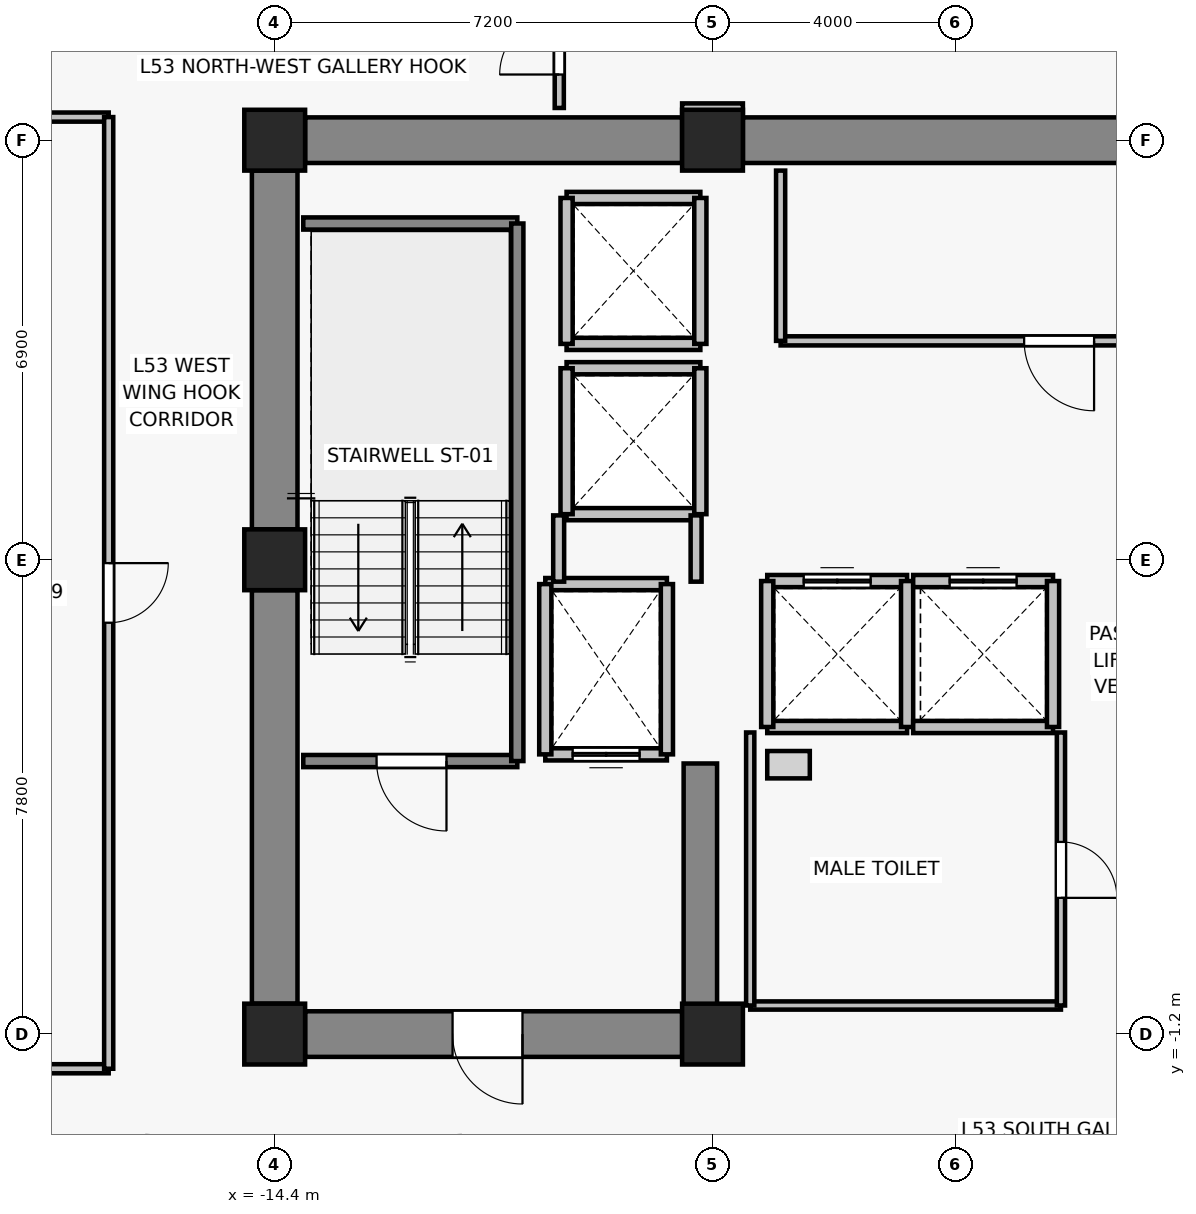
"""IFC4 building model, lengths in metres.
Left out: names, types, materials, properties, quantities, classifications, styles, units other than length and angle.
Written with IfcOpenShell. Run it as: python <this file> out.ifc"""

import sys

from ifc_helpers import new_model, si_unit, direction, frame, frame_2d, origin, origin_2d, place, context, subcontext, project, spatial, rectangle, extrude, source, transform, mapped, element, fill, save


model = new_model("IFC4")
c1 = context("Model", 3, precision=1e-05, world=origin(), true_north=direction((0.0, 1.0)))
c2 = subcontext(c1, "Body", "Model", "MODEL_VIEW")
j1 = project(units=[si_unit("LENGTHUNIT", "METRE"), si_unit("PLANEANGLEUNIT", "RADIAN")], contexts=[c1])
p1 = place(None, origin())
s1 = spatial("IfcSite", under=j1, at=p1, CompositionType="ELEMENT")
p2 = place(p1, origin())
s2 = spatial("IfcBuilding", under=s1, at=p2, CompositionType="ELEMENT")
p3 = place(p2, frame((0.0, 0.0, 189.1)))
s3 = spatial("IfcBuildingStorey", under=s2, at=p3, CompositionType="ELEMENT", Elevation=189.1)
for number, where, z_axis, x_axis in (
    (1, (-14.4, -1.2, 0.0), (0.0, 0.0, 1.0), (1.0, 0.0, 0.0)),
    (2, (-7.2, -1.2, 0.0), (0.0, 0.0, 1.0), (1.0, 0.0, 0.0)),
    (3, (-14.4, 6.6, 0.0), (0.0, 0.0, 1.0), (1.0, 0.0, 0.0)),
    (4, (-14.4, 13.5, 0.0), (0.0, 0.0, 1.0), (1.0, 0.0, 0.0)),
    (5, (-7.2, 13.5, 0.0), (0.0, 0.0, 1.0), (1.0, 0.0, 0.0)),
):
    element("IfcColumn", number, at=place(p3, frame(where, z_axis=z_axis, x_axis=x_axis)), inside=s3, PredefinedType="COLUMN", context=c2, shape_type="SweptSolid", body=[
        extrude(rectangle(XDim=1.0, YDim=1.0, at=origin_2d()), origin(), (0.0, 0.0, 1.0), 3.3),
    ])
p4 = place(p3, frame((-13.9, 13.5, 0.0), z_axis=(0.0, 0.0, 1.0), x_axis=(1.0, 0.0, 0.0)))
e6 = element("IfcWall", 6, at=p4, inside=s3, PredefinedType="SHEAR", context=c2, shape_type="SweptSolid", body=[
    extrude(rectangle(XDim=6.2, YDim=0.75, at=frame_2d((3.1, 0.0))), origin(), (0.0, 0.0, 1.0), 3.075),
])
p5 = place(p3, frame((-6.7, 13.5, 0.0), z_axis=(0.0, 0.0, 1.0), x_axis=(1.0, 0.0, 0.0)))
e7 = element("IfcWall", 7, at=p5, inside=s3, PredefinedType="SHEAR", context=c2, shape_type="SweptSolid", body=[
    extrude(rectangle(XDim=13.4, YDim=0.75, at=frame_2d((6.7, 0.0))), origin(), (0.0, 0.0, 1.0), 3.075),
])
p6 = place(p3, frame((-14.4, -0.7, 0.0), z_axis=(0.0, 0.0, 1.0), x_axis=(0.0, 1.0, 0.0)))
e8 = element("IfcWall", 8, at=p6, inside=s3, PredefinedType="SHEAR", context=c2, shape_type="SweptSolid", body=[
    extrude(rectangle(XDim=6.8, YDim=0.75, at=frame_2d((3.4, 0.0))), origin(), (0.0, 0.0, 1.0), 3.075),
])
p7 = place(p3, frame((-14.4, 7.1, 0.0), z_axis=(0.0, 0.0, 1.0), x_axis=(0.0, 1.0, 0.0)))
e9 = element("IfcWall", 9, at=p7, inside=s3, PredefinedType="SHEAR", context=c2, shape_type="SweptSolid", body=[
    extrude(rectangle(XDim=5.9, YDim=0.75, at=frame_2d((2.95, 0.0))), origin(), (0.0, 0.0, 1.0), 3.075),
])
p8 = place(p3, frame((-7.7, -1.2, 0.0), z_axis=(0.0, 0.0, 1.0), x_axis=(-1.0, 0.0, 0.0)))
e10 = element("IfcWall", 10, at=p8, inside=s3, PredefinedType="SHEAR", context=c2, shape_type="SweptSolid", body=[
    extrude(rectangle(XDim=6.2, YDim=0.75, at=frame_2d((3.1, 0.0))), origin(), (0.0, 0.0, 1.0), 3.075),
])
p9 = place(p8, frame((2.625, 0.0, 0.0)))
e11 = element("IfcOpeningElement", 11, at=p9, cuts=e10, PredefinedType="OPENING", context=c2, shape_type="SweptSolid", body=[
    extrude(rectangle(XDim=1.15, YDim=2.15, at=frame_2d((0.575, 1.075))), frame((0.0, 0.385, 0.0), z_axis=(0.0, -1.0, 0.0), x_axis=(1.0, 0.0, 0.0)), (0.0, 0.0, 1.0), 0.77),
])
p10 = place(p3, frame((-7.4, -0.825, 0.0), z_axis=(0.0, 0.0, 1.0), x_axis=(0.0, 1.0, 0.0)))
e12 = element("IfcWall", 12, at=p10, inside=s3, PredefinedType="SHEAR", context=c2, shape_type="SweptSolid", body=[
    extrude(rectangle(XDim=4.075, YDim=0.55, at=frame_2d((2.038, 0.0))), origin(), (0.0, 0.0, 1.0), 3.075),
])
p11 = place(p3, frame((-7.95, 3.4, 0.0), z_axis=(0.0, 0.0, 1.0), x_axis=(-1.0, 0.0, 0.0)))
e13 = element("IfcWall", 13, at=p11, inside=s3, PredefinedType="SOLIDWALL", context=c2, shape_type="SweptSolid", body=[
    extrude(rectangle(XDim=2.0, YDim=0.2, at=frame_2d((1.0, 0.0))), origin(), (0.0, 0.0, 1.0), 3.075),
])
p12 = place(p11, frame((0.45, 0.0, 0.0)))
e14 = element("IfcOpeningElement", 14, at=p12, cuts=e13, PredefinedType="OPENING", context=c2, shape_type="SweptSolid", body=[
    extrude(rectangle(XDim=1.1, YDim=2.2, at=frame_2d((0.55, 1.1))), frame((0.0, 0.11, 0.0), z_axis=(0.0, -1.0, 0.0), x_axis=(1.0, 0.0, 0.0)), (0.0, 0.0, 1.0), 0.22),
])
p13 = place(p3, frame((-9.95, 6.2, 0.0), z_axis=(0.0, 0.0, 1.0), x_axis=(1.0, 0.0, 0.0)))
e15 = element("IfcWall", 15, at=p13, inside=s3, PredefinedType="SOLIDWALL", context=c2, shape_type="SweptSolid", body=[
    extrude(rectangle(XDim=2.0, YDim=0.2, at=frame_2d((1.0, 0.0))), origin(), (0.0, 0.0, 1.0), 3.075),
])
for number, where, z_axis, x_axis in (
    (16, (-9.95, 3.4, 0.0), (0.0, 0.0, 1.0), (0.0, 1.0, 0.0)),
    (17, (-7.95, 6.2, 0.0), (0.0, 0.0, 1.0), (0.0, -1.0, 0.0)),
):
    element("IfcWall", number, at=place(p3, frame(where, z_axis=z_axis, x_axis=x_axis)), inside=s3, PredefinedType="SOLIDWALL", context=c2, shape_type="SweptSolid", body=[
        extrude(rectangle(XDim=2.8, YDim=0.2, at=frame_2d((1.4, 0.0))), origin(), (0.0, 0.0, 1.0), 3.075),
    ])
p14 = place(p3, frame((-4.0, 3.85, 0.0), z_axis=(0.0, 0.0, 1.0), x_axis=(-1.0, 0.0, 0.0)))
e18 = element("IfcWall", 18, at=p14, inside=s3, PredefinedType="SOLIDWALL", context=c2, shape_type="SweptSolid", body=[
    extrude(rectangle(XDim=2.3, YDim=0.2, at=frame_2d((1.15, 0.0))), origin(), (0.0, 0.0, 1.0), 3.075),
])
p15 = place(p3, frame((-6.3, 6.25, 0.0), z_axis=(0.0, 0.0, 1.0), x_axis=(1.0, 0.0, 0.0)))
e19 = element("IfcWall", 19, at=p15, inside=s3, PredefinedType="SOLIDWALL", context=c2, shape_type="SweptSolid", body=[
    extrude(rectangle(XDim=2.3, YDim=0.2, at=frame_2d((1.15, 0.0))), origin(), (0.0, 0.0, 1.0), 3.075),
])
p16 = place(p15, frame((0.6, 0.0, 0.0)))
e20 = element("IfcOpeningElement", 20, at=p16, cuts=e19, PredefinedType="OPENING", context=c2, shape_type="SweptSolid", body=[
    extrude(rectangle(XDim=1.1, YDim=2.2, at=frame_2d((0.55, 1.1))), frame((0.0, 0.11, 0.0), z_axis=(0.0, -1.0, 0.0), x_axis=(1.0, 0.0, 0.0)), (0.0, 0.0, 1.0), 0.22),
])
for number, where, z_axis, x_axis in (
    (21, (-6.3, 3.85, 0.0), (0.0, 0.0, 1.0), (0.0, 1.0, 0.0)),
    (22, (-4.0, 6.25, 0.0), (0.0, 0.0, 1.0), (0.0, -1.0, 0.0)),
):
    element("IfcWall", number, at=place(p3, frame(where, z_axis=z_axis, x_axis=x_axis)), inside=s3, PredefinedType="SOLIDWALL", context=c2, shape_type="SweptSolid", body=[
        extrude(rectangle(XDim=2.4, YDim=0.2, at=frame_2d((1.2, 0.0))), origin(), (0.0, 0.0, 1.0), 3.075),
    ])
p17 = place(p3, frame((-1.6, 3.85, 0.0), z_axis=(0.0, 0.0, 1.0), x_axis=(-1.0, 0.0, 0.0)))
e23 = element("IfcWall", 23, at=p17, inside=s3, PredefinedType="SOLIDWALL", context=c2, shape_type="SweptSolid", body=[
    extrude(rectangle(XDim=2.3, YDim=0.2, at=frame_2d((1.15, 0.0))), origin(), (0.0, 0.0, 1.0), 3.075),
])
p18 = place(p3, frame((-3.9, 6.25, 0.0), z_axis=(0.0, 0.0, 1.0), x_axis=(1.0, 0.0, 0.0)))
e24 = element("IfcWall", 24, at=p18, inside=s3, PredefinedType="SOLIDWALL", context=c2, shape_type="SweptSolid", body=[
    extrude(rectangle(XDim=2.3, YDim=0.2, at=frame_2d((1.15, 0.0))), origin(), (0.0, 0.0, 1.0), 3.075),
])
p19 = place(p18, frame((0.6, 0.0, 0.0)))
e25 = element("IfcOpeningElement", 25, at=p19, cuts=e24, PredefinedType="OPENING", context=c2, shape_type="SweptSolid", body=[
    extrude(rectangle(XDim=1.1, YDim=2.2, at=frame_2d((0.55, 1.1))), frame((0.0, 0.11, 0.0), z_axis=(0.0, -1.0, 0.0), x_axis=(1.0, 0.0, 0.0)), (0.0, 0.0, 1.0), 0.22),
])
p20 = place(p3, frame((-1.6, 6.25, 0.0), z_axis=(0.0, 0.0, 1.0), x_axis=(0.0, -1.0, 0.0)))
e26 = element("IfcWall", 26, at=p20, inside=s3, PredefinedType="SOLIDWALL", context=c2, shape_type="SweptSolid", body=[
    extrude(rectangle(XDim=2.4, YDim=0.2, at=frame_2d((1.2, 0.0))), origin(), (0.0, 0.0, 1.0), 3.075),
])
for number, where, z_axis, x_axis in (
    (27, (-7.4, 7.35, 0.0), (0.0, 0.0, 1.0), (-1.0, 0.0, 0.0)),
    (28, (-9.6, 9.75, 0.0), (0.0, 0.0, 1.0), (1.0, 0.0, 0.0)),
):
    element("IfcWall", number, at=place(p3, frame(where, z_axis=z_axis, x_axis=x_axis)), inside=s3, PredefinedType="SOLIDWALL", context=c2, shape_type="SweptSolid", body=[
        extrude(rectangle(XDim=2.2, YDim=0.2, at=frame_2d((1.1, 0.0))), origin(), (0.0, 0.0, 1.0), 2.565),
    ])
p21 = place(p3, frame((-9.6, 7.35, 0.0), z_axis=(0.0, 0.0, 1.0), x_axis=(0.0, 1.0, 0.0)))
e29 = element("IfcWall", 29, at=p21, inside=s3, PredefinedType="SOLIDWALL", context=c2, shape_type="SweptSolid", body=[
    extrude(rectangle(XDim=2.4, YDim=0.2, at=frame_2d((1.2, 0.0))), origin(), (0.0, 0.0, 1.0), 3.075),
])
p22 = place(p3, frame((-7.4, 9.75, 0.0), z_axis=(0.0, 0.0, 1.0), x_axis=(0.0, -1.0, 0.0)))
e30 = element("IfcWall", 30, at=p22, inside=s3, PredefinedType="SOLIDWALL", context=c2, shape_type="SweptSolid", body=[
    extrude(rectangle(XDim=2.4, YDim=0.2, at=frame_2d((1.2, 0.0))), origin(), (0.0, 0.0, 1.0), 2.565),
])
for number, where, z_axis, x_axis in (
    (31, (-7.4, 10.15, 0.0), (0.0, 0.0, 1.0), (-1.0, 0.0, 0.0)),
    (32, (-9.6, 12.55, 0.0), (0.0, 0.0, 1.0), (1.0, 0.0, 0.0)),
):
    element("IfcWall", number, at=place(p3, frame(where, z_axis=z_axis, x_axis=x_axis)), inside=s3, PredefinedType="SOLIDWALL", context=c2, shape_type="SweptSolid", body=[
        extrude(rectangle(XDim=2.2, YDim=0.2, at=frame_2d((1.1, 0.0))), origin(), (0.0, 0.0, 1.0), 2.565),
    ])
p23 = place(p3, frame((-9.6, 10.15, 0.0), z_axis=(0.0, 0.0, 1.0), x_axis=(0.0, 1.0, 0.0)))
e33 = element("IfcWall", 33, at=p23, inside=s3, PredefinedType="SOLIDWALL", context=c2, shape_type="SweptSolid", body=[
    extrude(rectangle(XDim=2.4, YDim=0.2, at=frame_2d((1.2, 0.0))), origin(), (0.0, 0.0, 1.0), 3.075),
])
p24 = place(p3, frame((-7.4, 12.55, 0.0), z_axis=(0.0, 0.0, 1.0), x_axis=(0.0, -1.0, 0.0)))
e34 = element("IfcWall", 34, at=p24, inside=s3, PredefinedType="SOLIDWALL", context=c2, shape_type="SweptSolid", body=[
    extrude(rectangle(XDim=2.4, YDim=0.2, at=frame_2d((1.2, 0.0))), origin(), (0.0, 0.0, 1.0), 2.565),
])
p25 = place(p3, frame((-10.41, 3.29, 0.0), z_axis=(0.0, 0.0, 1.0), x_axis=(-1.0, 0.0, 0.0)))
e35 = element("IfcWall", 35, at=p25, inside=s3, PredefinedType="SOLIDWALL", context=c2, shape_type="SweptSolid", body=[
    extrude(rectangle(XDim=3.52, YDim=0.2, at=frame_2d((1.76, 0.0))), origin(), (0.0, 0.0, 1.0), 3.075),
])
p26 = place(p25, frame((1.165, 0.0, 0.0)))
e36 = element("IfcOpeningElement", 36, at=p26, cuts=e35, PredefinedType="OPENING", context=c2, shape_type="SweptSolid", body=[
    extrude(rectangle(XDim=1.15, YDim=2.15, at=frame_2d((0.575, 1.075))), frame((0.0, 0.11, 0.0), z_axis=(0.0, -1.0, 0.0), x_axis=(1.0, 0.0, 0.0)), (0.0, 0.0, 1.0), 0.22),
])
p27 = place(p3, frame((-13.93, 12.13, 0.0), z_axis=(0.0, 0.0, 1.0), x_axis=(1.0, 0.0, 0.0)))
e37 = element("IfcWall", 37, at=p27, inside=s3, PredefinedType="SOLIDWALL", context=c2, shape_type="SweptSolid", body=[
    extrude(rectangle(XDim=3.52, YDim=0.2, at=frame_2d((1.76, 0.0))), origin(), (0.0, 0.0, 1.0), 3.075),
])
p28 = place(p3, frame((-10.41, 12.13, 0.0), z_axis=(0.0, 0.0, 1.0), x_axis=(0.0, -1.0, 0.0)))
e38 = element("IfcWall", 38, at=p28, inside=s3, PredefinedType="SOLIDWALL", context=c2, shape_type="SweptSolid", body=[
    extrude(rectangle(XDim=8.84, YDim=0.2, at=frame_2d((4.42, 0.0))), origin(), (0.0, 0.0, 1.0), 3.075),
])
p29 = place(p3, frame((-9.73, 6.24, 0.0), z_axis=(0.0, 0.0, 1.0), x_axis=(0.0, 1.0, 0.0)))
e39 = element("IfcWall", 39, at=p29, inside=s3, PredefinedType="PARTITIONING", context=c2, shape_type="SweptSolid", body=[
    extrude(rectangle(XDim=1.09, YDim=0.18, at=frame_2d((0.545, 0.0))), origin(), (0.0, 0.0, 1.0), 3.075),
])
p30 = place(p3, frame((-7.47, 7.33, 0.0), z_axis=(0.0, 0.0, 1.0), x_axis=(0.0, -1.0, 0.0)))
e40 = element("IfcWall", 40, at=p30, inside=s3, PredefinedType="PARTITIONING", context=c2, shape_type="SweptSolid", body=[
    extrude(rectangle(XDim=1.09, YDim=0.18, at=frame_2d((0.545, 0.0))), origin(), (0.0, 0.0, 1.0), 2.565),
])
p31 = place(p3, frame((6.08, 10.2, 0.0), z_axis=(0.0, 0.0, 1.0), x_axis=(-1.0, 0.0, 0.0)))
e41 = element("IfcWall", 41, at=p31, inside=s3, PredefinedType="PARTITIONING", context=c2, shape_type="SweptSolid", body=[
    extrude(rectangle(XDim=12.16, YDim=0.15, at=frame_2d((6.08, 0.0))), origin(), (0.0, 0.0, 1.0), 3.075),
])
p32 = place(p31, frame((7.005, 0.0, 0.0)))
e42 = element("IfcOpeningElement", 42, at=p32, cuts=e41, PredefinedType="OPENING", context=c2, shape_type="SweptSolid", body=[
    extrude(rectangle(XDim=1.15, YDim=2.15, at=frame_2d((0.575, 1.075))), frame((0.0, 0.085, 0.0), z_axis=(0.0, -1.0, 0.0), x_axis=(1.0, 0.0, 0.0)), (0.0, 0.0, 1.0), 0.17),
])
p33 = place(p3, frame((-6.08, 10.2, 0.0), z_axis=(0.0, 0.0, 1.0), x_axis=(0.0, 1.0, 0.0)))
e43 = element("IfcWall", 43, at=p33, inside=s3, PredefinedType="PARTITIONING", context=c2, shape_type="SweptSolid", body=[
    extrude(rectangle(XDim=2.8, YDim=0.15, at=frame_2d((1.4, 0.0))), origin(), (0.0, 0.0, 1.0), 3.075),
])
p34 = place(p3, frame((-1.47, -0.73, 0.0), z_axis=(0.0, 0.0, 1.0), x_axis=(-1.0, 0.0, 0.0)))
e44 = element("IfcWall", 44, at=p34, inside=s3, PredefinedType="PARTITIONING", context=c2, shape_type="SweptSolid", body=[
    extrude(rectangle(XDim=5.11, YDim=0.135, at=frame_2d((2.555, 0.0))), origin(), (0.0, 0.0, 1.0), 3.075),
])
p35 = place(p3, frame((-6.58, -0.73, 0.0), z_axis=(0.0, 0.0, 1.0), x_axis=(0.0, 1.0, 0.0)))
e45 = element("IfcWall", 45, at=p35, inside=s3, PredefinedType="PARTITIONING", context=c2, shape_type="SweptSolid", body=[
    extrude(rectangle(XDim=4.49, YDim=0.135, at=frame_2d((2.245, 0.0))), origin(), (0.0, 0.0, 1.0), 3.075),
])
p36 = place(p3, frame((-1.47, 3.76, 0.0), z_axis=(0.0, 0.0, 1.0), x_axis=(0.0, -1.0, 0.0)))
e46 = element("IfcWall", 46, at=p36, inside=s3, PredefinedType="PARTITIONING", context=c2, shape_type="SweptSolid", body=[
    extrude(rectangle(XDim=4.49, YDim=0.135, at=frame_2d((2.245, 0.0))), origin(), (0.0, 0.0, 1.0), 3.075),
])
p37 = place(p36, frame((1.8, 0.0, 0.0)))
e47 = element("IfcOpeningElement", 47, at=p37, cuts=e46, PredefinedType="OPENING", context=c2, shape_type="SweptSolid", body=[
    extrude(rectangle(XDim=0.92, YDim=2.1, at=frame_2d((0.46, 1.05))), frame((0.0, 0.077, 0.0), z_axis=(0.0, -1.0, 0.0), x_axis=(1.0, 0.0, 0.0)), (0.0, 0.0, 1.0), 0.155),
])
p38 = place(p3, frame((-17.13, -1.77, 0.0), z_axis=(0.0, 0.0, 1.0), x_axis=(-1.0, 0.0, 0.0)))
e48 = element("IfcWall", 48, at=p38, inside=s3, PredefinedType="PARTITIONING", context=c2, shape_type="SweptSolid", body=[
    extrude(rectangle(XDim=5.4, YDim=0.15, at=frame_2d((2.7, 0.0))), origin(), (0.0, 0.0, 1.0), 2.565),
])
p39 = place(p3, frame((-22.53, 13.88, 0.0), z_axis=(0.0, 0.0, 1.0), x_axis=(1.0, 0.0, 0.0)))
e49 = element("IfcWall", 49, at=p39, inside=s3, PredefinedType="PARTITIONING", context=c2, shape_type="SweptSolid", body=[
    extrude(rectangle(XDim=5.4, YDim=0.15, at=frame_2d((2.7, 0.0))), origin(), (0.0, 0.0, 1.0), 3.075),
])
p40 = place(p3, frame((-17.13, 13.88, 0.0), z_axis=(0.0, 0.0, 1.0), x_axis=(0.0, -1.0, 0.0)))
e50 = element("IfcWall", 50, at=p40, inside=s3, PredefinedType="PARTITIONING", context=c2, shape_type="SweptSolid", body=[
    extrude(rectangle(XDim=15.65, YDim=0.15, at=frame_2d((7.825, 0.0))), origin(), (0.0, 0.0, 1.0), 2.565),
])
p41 = place(p40, frame((7.335, 0.0, 0.0)))
e51 = element("IfcOpeningElement", 51, at=p41, cuts=e50, PredefinedType="OPENING", context=c2, shape_type="SweptSolid", body=[
    extrude(rectangle(XDim=0.98, YDim=2.15, at=frame_2d((0.49, 1.075))), frame((0.0, 0.085, 0.0), z_axis=(0.0, -1.0, 0.0), x_axis=(1.0, 0.0, 0.0)), (0.0, 0.0, 1.0), 0.17),
])
p42 = place(p3, frame((-6.7, 14.03, 0.0), z_axis=(0.0, 0.0, 1.0), x_axis=(-1.0, 0.0, 0.0)))
e52 = element("IfcWall", 52, at=p42, inside=s3, PredefinedType="PARTITIONING", context=c2, shape_type="SweptSolid", body=[
    extrude(rectangle(XDim=1.0, YDim=0.15, at=frame_2d((0.5, 0.0))), origin(), (0.0, 0.0, 1.0), 2.565),
])
p43 = place(p3, frame((-9.72, 14.03, 0.0), z_axis=(0.0, 0.0, 1.0), x_axis=(0.0, 1.0, 0.0)))
e53 = element("IfcWall", 53, at=p43, inside=s3, PredefinedType="PARTITIONING", context=c2, shape_type="SweptSolid", body=[
    extrude(rectangle(XDim=3.3, YDim=0.15, at=frame_2d((1.65, 0.0))), origin(), (0.0, 0.0, 1.0), 2.565),
])
p44 = place(p43, frame((0.55, 0.0, 0.0)))
e54 = element("IfcOpeningElement", 54, at=p44, cuts=e53, PredefinedType="OPENING", context=c2, shape_type="SweptSolid", body=[
    extrude(rectangle(XDim=0.98, YDim=2.15, at=frame_2d((0.49, 1.075))), frame((0.0, 0.085, 0.0), z_axis=(0.0, -1.0, 0.0), x_axis=(1.0, 0.0, 0.0)), (0.0, 0.0, 1.0), 0.17),
])
m1 = source(origin(), c2, "Body", "SweptSolid", [
    extrude(rectangle(XDim=1.1, YDim=2.2, at=frame_2d((0.55, 1.1))), frame((0.0, 0.025, 0.0), z_axis=(0.0, -1.0, 0.0), x_axis=(1.0, 0.0, 0.0)), (0.0, 0.0, 1.0), 0.05),
])
p45 = place(p12, origin())
e55 = element("IfcDoor", 55, at=p45, inside=s3, OperationType="DOUBLE_DOOR_SLIDING", PredefinedType="DOOR", context=c2, shape_type="MappedRepresentation", body=[
    mapped(m1, transform((0.0, 0.0, 0.0), x_axis=(1.0, 0.0, 0.0), y_axis=(0.0, 1.0, 0.0), z_axis=(0.0, 0.0, 1.0), scale=1.0)),
])
fill(e14, e55)
p46 = place(p16, origin())
e56 = element("IfcDoor", 56, at=p46, inside=s3, OperationType="DOUBLE_DOOR_SLIDING", PredefinedType="DOOR", context=c2, shape_type="MappedRepresentation", body=[
    mapped(m1, transform((0.0, 0.0, 0.0), x_axis=(1.0, 0.0, 0.0), y_axis=(0.0, 1.0, 0.0), z_axis=(0.0, 0.0, 1.0), scale=1.0)),
])
fill(e20, e56)
p47 = place(p19, origin())
e57 = element("IfcDoor", 57, at=p47, inside=s3, OperationType="DOUBLE_DOOR_SLIDING", PredefinedType="DOOR", context=c2, shape_type="MappedRepresentation", body=[
    mapped(m1, transform((0.0, 0.0, 0.0), x_axis=(1.0, 0.0, 0.0), y_axis=(0.0, 1.0, 0.0), z_axis=(0.0, 0.0, 1.0), scale=1.0)),
])
fill(e25, e57)
m2 = source(origin(), c2, "Body", "SweptSolid", [
    extrude(rectangle(XDim=1.15, YDim=2.15, at=frame_2d((0.575, 1.075))), frame((0.0, 0.025, 0.0), z_axis=(0.0, -1.0, 0.0), x_axis=(1.0, 0.0, 0.0)), (0.0, 0.0, 1.0), 0.05),
])
p48 = place(p26, origin())
e58 = element("IfcDoor", 58, at=p48, inside=s3, OperationType="SINGLE_SWING_LEFT", PredefinedType="DOOR", context=c2, shape_type="MappedRepresentation", body=[
    mapped(m2, transform((0.0, 0.0, 0.0), x_axis=(1.0, 0.0, 0.0), y_axis=(0.0, 1.0, 0.0), z_axis=(0.0, 0.0, 1.0), scale=1.0)),
])
fill(e36, e58)
p49 = place(p9, origin())
e59 = element("IfcDoor", 59, at=p49, inside=s3, OperationType="SINGLE_SWING_LEFT", PredefinedType="DOOR", context=c2, shape_type="MappedRepresentation", body=[
    mapped(m2, transform((0.0, 0.0, 0.0), x_axis=(1.0, 0.0, 0.0), y_axis=(0.0, 1.0, 0.0), z_axis=(0.0, 0.0, 1.0), scale=1.0)),
])
fill(e11, e59)
p50 = place(p32, origin())
e60 = element("IfcDoor", 60, at=p50, inside=s3, OperationType="SINGLE_SWING_LEFT", PredefinedType="DOOR", context=c2, shape_type="MappedRepresentation", body=[
    mapped(m2, transform((0.0, 0.0, 0.0), x_axis=(1.0, 0.0, 0.0), y_axis=(0.0, 1.0, 0.0), z_axis=(0.0, 0.0, 1.0), scale=1.0)),
])
fill(e42, e60)
m3 = source(origin(), c2, "Body", "SweptSolid", [
    extrude(rectangle(XDim=0.92, YDim=2.1, at=frame_2d((0.46, 1.05))), frame((0.0, 0.025, 0.0), z_axis=(0.0, -1.0, 0.0), x_axis=(1.0, 0.0, 0.0)), (0.0, 0.0, 1.0), 0.05),
])
p51 = place(p37, origin())
e61 = element("IfcDoor", 61, at=p51, inside=s3, OperationType="SINGLE_SWING_RIGHT", PredefinedType="DOOR", context=c2, shape_type="MappedRepresentation", body=[
    mapped(m3, transform((0.0, 0.0, 0.0), x_axis=(1.0, 0.0, 0.0), y_axis=(0.0, 1.0, 0.0), z_axis=(0.0, 0.0, 1.0), scale=1.0)),
])
fill(e47, e61)
m4 = source(origin(), c2, "Body", "SweptSolid", [
    extrude(rectangle(XDim=0.98, YDim=2.15, at=frame_2d((0.49, 1.075))), frame((0.0, 0.025, 0.0), z_axis=(0.0, -1.0, 0.0), x_axis=(1.0, 0.0, 0.0)), (0.0, 0.0, 1.0), 0.05),
])
p52 = place(p41, origin())
e62 = element("IfcDoor", 62, at=p52, inside=s3, OperationType="SINGLE_SWING_LEFT", PredefinedType="DOOR", context=c2, shape_type="MappedRepresentation", body=[
    mapped(m4, transform((0.0, 0.0, 0.0), x_axis=(1.0, 0.0, 0.0), y_axis=(0.0, 1.0, 0.0), z_axis=(0.0, 0.0, 1.0), scale=1.0)),
])
fill(e51, e62)
p53 = place(p44, origin())
e63 = element("IfcDoor", 63, at=p53, inside=s3, OperationType="SINGLE_SWING_LEFT", PredefinedType="DOOR", context=c2, shape_type="MappedRepresentation", body=[
    mapped(m4, transform((0.0, 0.0, 0.0), x_axis=(1.0, 0.0, 0.0), y_axis=(0.0, 1.0, 0.0), z_axis=(0.0, 0.0, 1.0), scale=1.0)),
])
fill(e54, e63)
save(model, sys.argv[1])
